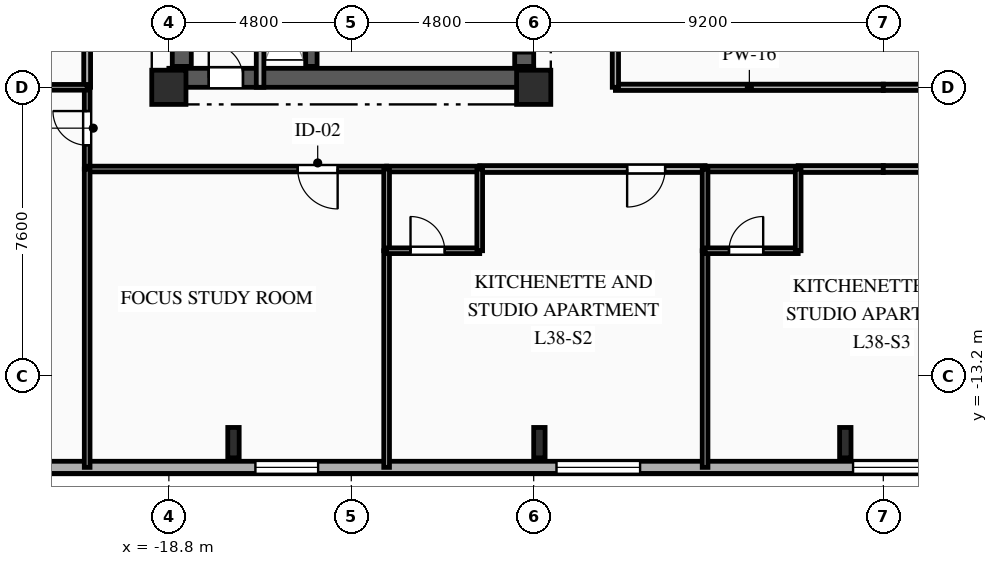
"""IFC4 building model, lengths in metres.
Left out: names, types, materials, properties, quantities, classifications, styles, units other than length and angle.
Written with IfcOpenShell. Run it as: python <this file> out.ifc"""

import sys

from ifc_helpers import new_model, si_unit, direction, frame, frame_2d, origin, origin_2d, place, context, subcontext, project, spatial, rectangle, i_section, extrude, element, fill, save


model = new_model("IFC4")
c1 = context("Model", 3, precision=1e-05, world=origin(), true_north=direction((0.0, 1.0)))
c2 = subcontext(c1, "Body", "Model", "MODEL_VIEW")
j1 = project(units=[si_unit("LENGTHUNIT", "METRE"), si_unit("PLANEANGLEUNIT", "RADIAN")], contexts=[c1])
p1 = place(None, origin())
s1 = spatial("IfcSite", under=j1, at=p1, CompositionType="ELEMENT")
p2 = place(p1, origin())
s2 = spatial("IfcBuilding", under=s1, at=p2, CompositionType="ELEMENT")
p3 = place(p2, frame((0.0, 0.0, 137.7)))
s3 = spatial("IfcBuildingStorey", under=s2, at=p3, CompositionType="ELEMENT", Elevation=137.7)
for number, where, z_axis, x_axis in (
    (1, (-18.8, -5.6, 0.0), (0.0, 0.0, 1.0), (1.0, 0.0, 0.0)),
    (2, (-9.2, -5.6, 0.0), (0.0, 0.0, 1.0), (1.0, 0.0, 0.0)),
):
    element("IfcColumn", number, at=place(p3, frame(where, z_axis=z_axis, x_axis=x_axis)), inside=s3, PredefinedType="COLUMN", context=c2, shape_type="SweptSolid", body=[
        extrude(rectangle(XDim=0.9, YDim=0.9, at=origin_2d()), origin(), (0.0, 0.0, 1.0), 3.35),
    ])
for number, where, z_axis, x_axis in (
    (3, (-17.1, -14.95, 0.0), (0.0, 0.0, 1.0), (1.0, 0.0, 0.0)),
    (4, (-9.05, -14.95, 0.0), (0.0, 0.0, 1.0), (1.0, 0.0, 0.0)),
    (5, (-1.0, -14.95, 0.0), (0.0, 0.0, 1.0), (1.0, 0.0, 0.0)),
):
    element("IfcColumn", number, at=place(p3, frame(where, z_axis=z_axis, x_axis=x_axis)), inside=s3, PredefinedType="COLUMN", context=c2, shape_type="SweptSolid", body=[
        extrude(i_section(OverallWidth=0.3, OverallDepth=0.8, WebThickness=0.018, FlangeThickness=0.033, FilletRadius=0.03, at=origin_2d()), origin(), (0.0, 0.0, 1.0), 3.35),
    ])
p4 = place(p3, frame((23.8, -15.6, 0.0), z_axis=(0.0, 0.0, 1.0), x_axis=(-1.0, 0.0, 0.0)))
e6 = element("IfcWall", 6, at=p4, inside=s3, PredefinedType="SOLIDWALL", context=c2, shape_type="SweptSolid", body=[
    extrude(rectangle(XDim=49.6, YDim=0.32, at=frame_2d((24.8, 0.0))), origin(), (0.0, 0.0, 1.0), 3.04),
])
p5 = place(p4, frame((1.13, 0.0, 0.85)))
e7 = element("IfcOpeningElement", 7, at=p5, cuts=e6, PredefinedType="OPENING", context=c2, shape_type="SweptSolid", body=[
    extrude(rectangle(XDim=1.1, YDim=1.85, at=frame_2d((0.55, 0.925))), frame((0.0, 0.17, 0.0), z_axis=(0.0, -1.0, 0.0), x_axis=(1.0, 0.0, 0.0)), (0.0, 0.0, 1.0), 0.34),
])
p6 = place(p4, frame((6.495, 0.0, 0.85)))
e8 = element("IfcOpeningElement", 8, at=p6, cuts=e6, PredefinedType="OPENING", context=c2, shape_type="SweptSolid", body=[
    extrude(rectangle(XDim=1.65, YDim=1.85, at=frame_2d((0.825, 0.925))), frame((0.0, 0.17, 0.0), z_axis=(0.0, -1.0, 0.0), x_axis=(1.0, 0.0, 0.0)), (0.0, 0.0, 1.0), 0.34),
])
p7 = place(p4, frame((13.996, 0.0, 0.85)))
e9 = element("IfcOpeningElement", 9, at=p7, cuts=e6, PredefinedType="OPENING", context=c2, shape_type="SweptSolid", body=[
    extrude(rectangle(XDim=2.2, YDim=1.85, at=frame_2d((1.1, 0.925))), frame((0.0, 0.17, 0.0), z_axis=(0.0, -1.0, 0.0), x_axis=(1.0, 0.0, 0.0)), (0.0, 0.0, 1.0), 0.34),
])
p8 = place(p4, frame((22.396, 0.0, 0.85)))
e10 = element("IfcOpeningElement", 10, at=p8, cuts=e6, PredefinedType="OPENING", context=c2, shape_type="SweptSolid", body=[
    extrude(rectangle(XDim=2.2, YDim=1.85, at=frame_2d((1.1, 0.925))), frame((0.0, 0.17, 0.0), z_axis=(0.0, -1.0, 0.0), x_axis=(1.0, 0.0, 0.0)), (0.0, 0.0, 1.0), 0.34),
])
p9 = place(p4, frame((30.2, 0.0, 0.85)))
e11 = element("IfcOpeningElement", 11, at=p9, cuts=e6, PredefinedType="OPENING", context=c2, shape_type="SweptSolid", body=[
    extrude(rectangle(XDim=2.2, YDim=1.85, at=frame_2d((1.1, 0.925))), frame((0.0, 0.17, 0.0), z_axis=(0.0, -1.0, 0.0), x_axis=(1.0, 0.0, 0.0)), (0.0, 0.0, 1.0), 0.34),
])
p10 = place(p4, frame((38.673, 0.0, 0.85)))
e12 = element("IfcOpeningElement", 12, at=p10, cuts=e6, PredefinedType="OPENING", context=c2, shape_type="SweptSolid", body=[
    extrude(rectangle(XDim=1.65, YDim=1.85, at=frame_2d((0.825, 0.925))), frame((0.0, 0.17, 0.0), z_axis=(0.0, -1.0, 0.0), x_axis=(1.0, 0.0, 0.0)), (0.0, 0.0, 1.0), 0.34),
])
p11 = place(p4, frame((46.175, 0.0, 0.85)))
e13 = element("IfcOpeningElement", 13, at=p11, cuts=e6, PredefinedType="OPENING", context=c2, shape_type="SweptSolid", body=[
    extrude(rectangle(XDim=1.65, YDim=1.85, at=frame_2d((0.825, 0.925))), frame((0.0, 0.17, 0.0), z_axis=(0.0, -1.0, 0.0), x_axis=(1.0, 0.0, 0.0)), (0.0, 0.0, 1.0), 0.34),
])
p12 = place(p3, frame((-18.8, -5.35, 0.0), z_axis=(0.0, 0.0, 1.0), x_axis=(1.0, 0.0, 0.0)))
e14 = element("IfcWall", 14, at=p12, inside=s3, PredefinedType="SHEAR", context=c2, shape_type="SweptSolid", body=[
    extrude(rectangle(XDim=9.6, YDim=0.5, at=frame_2d((4.8, 0.0))), origin(), (0.0, 0.0, 1.0), 3.04),
])
p13 = place(p12, frame((1.05, 0.0, 0.0)))
e15 = element("IfcOpeningElement", 15, at=p13, cuts=e14, PredefinedType="OPENING", context=c2, shape_type="SweptSolid", body=[
    extrude(rectangle(XDim=0.9, YDim=2.1, at=frame_2d((0.45, 1.05))), frame((0.0, 0.26, 0.0), z_axis=(0.0, -1.0, 0.0), x_axis=(1.0, 0.0, 0.0)), (0.0, 0.0, 1.0), 0.52),
])
p14 = place(p3, frame((-18.46, -5.05, 0.0), z_axis=(0.0, 0.0, 1.0), x_axis=(0.0, 1.0, 0.0)))
e16 = element("IfcWall", 16, at=p14, inside=s3, PredefinedType="SHEAR", context=c2, shape_type="SweptSolid", body=[
    extrude(rectangle(XDim=10.1, YDim=0.5, at=frame_2d((5.05, 0.0))), origin(), (0.0, 0.0, 1.0), 3.04),
])
p15 = place(p3, frame((-9.45, -5.05, 0.0), z_axis=(0.0, 0.0, 1.0), x_axis=(0.0, 1.0, 0.0)))
e17 = element("IfcWall", 17, at=p15, inside=s3, PredefinedType="SHEAR", context=c2, shape_type="SweptSolid", body=[
    extrude(rectangle(XDim=10.1, YDim=0.5, at=frame_2d((5.05, 0.0))), origin(), (0.0, 0.0, 1.0), 3.04),
])
p16 = place(p15, frame((7.15, 0.0, 0.0)))
e18 = element("IfcOpeningElement", 18, at=p16, cuts=e17, PredefinedType="OPENING", context=c2, shape_type="SweptSolid", body=[
    extrude(rectangle(XDim=0.9, YDim=2.1, at=frame_2d((0.45, 1.05))), frame((0.0, 0.26, 0.0), z_axis=(0.0, -1.0, 0.0), x_axis=(1.0, 0.0, 0.0)), (0.0, 0.0, 1.0), 0.52),
])
p17 = place(p15, frame((2.4, 0.0, 0.0)))
e19 = element("IfcOpeningElement", 19, at=p17, cuts=e17, PredefinedType="OPENING", context=c2, shape_type="SweptSolid", body=[
    extrude(rectangle(XDim=1.2, YDim=2.15, at=frame_2d((0.6, 1.075))), frame((0.0, 0.26, 0.0), z_axis=(0.0, -1.0, 0.0), x_axis=(1.0, 0.0, 0.0)), (0.0, 0.0, 1.0), 0.52),
])
p18 = place(p15, frame((0.35, 0.0, 0.0)))
e20 = element("IfcOpeningElement", 20, at=p18, cuts=e17, PredefinedType="OPENING", context=c2, shape_type="SweptSolid", body=[
    extrude(rectangle(XDim=0.9, YDim=2.1, at=frame_2d((0.45, 1.05))), frame((0.0, 0.26, 0.0), z_axis=(0.0, -1.0, 0.0), x_axis=(1.0, 0.0, 0.0)), (0.0, 0.0, 1.0), 0.52),
])
p19 = place(p15, frame((5.0, 0.0, 0.0)))
e21 = element("IfcOpeningElement", 21, at=p19, cuts=e17, PredefinedType="OPENING", context=c2, shape_type="SweptSolid", body=[
    extrude(rectangle(XDim=0.9, YDim=2.1, at=frame_2d((0.45, 1.05))), frame((0.0, 0.26, 0.0), z_axis=(0.0, -1.0, 0.0), x_axis=(1.0, 0.0, 0.0)), (0.0, 0.0, 1.0), 0.52),
])
p20 = place(p3, frame((-15.05, -5.05, 0.0), z_axis=(0.0, 0.0, 1.0), x_axis=(0.0, 1.0, 0.0)))
e22 = element("IfcWall", 22, at=p20, inside=s3, PredefinedType="SHEAR", context=c2, shape_type="SweptSolid", body=[
    extrude(rectangle(XDim=10.1, YDim=0.3, at=frame_2d((5.05, 0.0))), origin(), (0.0, 0.0, 1.0), 3.04),
])
p21 = place(p3, frame((-16.4, -5.6, 0.0), z_axis=(0.0, 0.0, 1.0), x_axis=(0.0, 1.0, 0.0)))
e23 = element("IfcWall", 23, at=p21, inside=s3, PredefinedType="PARTITIONING", context=c2, shape_type="SweptSolid", body=[
    extrude(rectangle(XDim=3.49, YDim=0.2, at=frame_2d((1.745, 0.0))), origin(), (0.0, 0.0, 1.0), 3.04),
])
p22 = place(p3, frame((-20.95, -7.75, 0.0), z_axis=(0.0, 0.0, 1.0), x_axis=(0.0, 1.0, 0.0)))
e24 = element("IfcWall", 24, at=p22, inside=s3, PredefinedType="PARTITIONING", context=c2, shape_type="SweptSolid", body=[
    extrude(rectangle(XDim=2.15, YDim=0.15, at=frame_2d((1.075, 0.0))), origin(), (0.0, 0.0, 1.0), 3.04),
])
p23 = place(p22, frame((0.625, 0.0, 0.0)))
e25 = element("IfcOpeningElement", 25, at=p23, cuts=e24, PredefinedType="OPENING", context=c2, shape_type="SweptSolid", body=[
    extrude(rectangle(XDim=0.9, YDim=2.1, at=frame_2d((0.45, 1.05))), frame((0.0, 0.085, 0.0), z_axis=(0.0, -1.0, 0.0), x_axis=(1.0, 0.0, 0.0)), (0.0, 0.0, 1.0), 0.17),
])
p24 = place(p3, frame((-13.07, -7.75, 0.0), z_axis=(0.0, 0.0, 1.0), x_axis=(-1.0, 0.0, 0.0)))
e26 = element("IfcWall", 26, at=p24, inside=s3, PredefinedType="PARTITIONING", context=c2, shape_type="SweptSolid", body=[
    extrude(rectangle(XDim=7.88, YDim=0.15, at=frame_2d((3.94, 0.0))), origin(), (0.0, 0.0, 1.0), 3.04),
])
p25 = place(p24, frame((1.289, 0.0, 0.0)))
e27 = element("IfcOpeningElement", 27, at=p25, cuts=e26, PredefinedType="OPENING", context=c2, shape_type="SweptSolid", body=[
    extrude(rectangle(XDim=1.05, YDim=2.15, at=frame_2d((0.525, 1.075))), frame((0.0, 0.085, 0.0), z_axis=(0.0, -1.0, 0.0), x_axis=(1.0, 0.0, 0.0)), (0.0, 0.0, 1.0), 0.17),
])
p26 = place(p3, frame((-4.69, -7.75, 0.0), z_axis=(0.0, 0.0, 1.0), x_axis=(-1.0, 0.0, 0.0)))
e28 = element("IfcWall", 28, at=p26, inside=s3, PredefinedType="PARTITIONING", context=c2, shape_type="SweptSolid", body=[
    extrude(rectangle(XDim=5.93, YDim=0.18, at=frame_2d((2.965, 0.0))), origin(), (0.0, 0.0, 1.0), 3.04),
])
p27 = place(p26, frame((1.051, 0.0, 0.0)))
e29 = element("IfcOpeningElement", 29, at=p27, cuts=e28, PredefinedType="OPENING", context=c2, shape_type="SweptSolid", body=[
    extrude(rectangle(XDim=1.0, YDim=2.15, at=frame_2d((0.5, 1.075))), frame((0.0, 0.1, 0.0), z_axis=(0.0, -1.0, 0.0), x_axis=(1.0, 0.0, 0.0)), (0.0, 0.0, 1.0), 0.2),
])
p28 = place(p3, frame((-10.62, -7.75, 0.0), z_axis=(0.0, 0.0, 1.0), x_axis=(-1.0, 0.0, 0.0)))
e30 = element("IfcWall", 30, at=p28, inside=s3, PredefinedType="PLUMBINGWALL", context=c2, shape_type="SweptSolid", body=[
    extrude(rectangle(XDim=2.45, YDim=0.15, at=frame_2d((1.225, 0.0))), origin(), (0.0, 0.0, 1.0), 3.04),
])
p29 = place(p3, frame((0.0, -7.75, 0.0), z_axis=(0.0, 0.0, 1.0), x_axis=(-1.0, 0.0, 0.0)))
e31 = element("IfcWall", 31, at=p29, inside=s3, PredefinedType="PARTITIONING", context=c2, shape_type="SweptSolid", body=[
    extrude(rectangle(XDim=2.24, YDim=0.18, at=frame_2d((1.12, 0.0))), origin(), (0.0, 0.0, 1.0), 3.04),
])
p30 = place(p3, frame((-2.24, -7.75, 0.0), z_axis=(0.0, 0.0, 1.0), x_axis=(-1.0, 0.0, 0.0)))
e32 = element("IfcWall", 32, at=p30, inside=s3, PredefinedType="PLUMBINGWALL", context=c2, shape_type="SweptSolid", body=[
    extrude(rectangle(XDim=2.45, YDim=0.15, at=frame_2d((1.225, 0.0))), origin(), (0.0, 0.0, 1.0), 3.04),
])
p31 = place(p3, frame((-7.05, -5.6, 0.0), z_axis=(0.0, 0.0, 1.0), x_axis=(1.0, 0.0, 0.0)))
e33 = element("IfcWall", 33, at=p31, inside=s3, PredefinedType="PARTITIONING", context=c2, shape_type="SweptSolid", body=[
    extrude(rectangle(XDim=7.05, YDim=0.165, at=frame_2d((3.525, 0.0))), origin(), (0.0, 0.0, 1.0), 2.525),
])
p32 = place(p3, frame((3.69, -7.75, 0.0), z_axis=(0.0, 0.0, 1.0), x_axis=(-1.0, 0.0, 0.0)))
e34 = element("IfcWall", 34, at=p32, inside=s3, PredefinedType="PARTITIONING", context=c2, shape_type="SweptSolid", body=[
    extrude(rectangle(XDim=3.69, YDim=0.18, at=frame_2d((1.845, 0.0))), origin(), (0.0, 0.0, 1.0), 3.04),
])
p33 = place(p32, frame((1.536, 0.0, 0.0)))
e35 = element("IfcOpeningElement", 35, at=p33, cuts=e34, PredefinedType="OPENING", context=c2, shape_type="SweptSolid", body=[
    extrude(rectangle(XDim=1.0, YDim=2.15, at=frame_2d((0.5, 1.075))), frame((0.0, 0.1, 0.0), z_axis=(0.0, -1.0, 0.0), x_axis=(1.0, 0.0, 0.0)), (0.0, 0.0, 1.0), 0.2),
])
p34 = place(p3, frame((0.0, -5.6, 0.0), z_axis=(0.0, 0.0, 1.0), x_axis=(1.0, 0.0, 0.0)))
e36 = element("IfcWall", 36, at=p34, inside=s3, PredefinedType="PARTITIONING", context=c2, shape_type="SweptSolid", body=[
    extrude(rectangle(XDim=7.05, YDim=0.165, at=frame_2d((3.525, 0.0))), origin(), (0.0, 0.0, 1.0), 2.525),
])
p35 = place(p3, frame((-20.95, -5.6, 0.0), z_axis=(0.0, 0.0, 1.0), x_axis=(0.0, 1.0, 0.0)))
e37 = element("IfcWall", 37, at=p35, inside=s3, PredefinedType="PARTITIONING", context=c2, shape_type="SweptSolid", body=[
    extrude(rectangle(XDim=14.1, YDim=0.18, at=frame_2d((7.05, 0.0))), origin(), (0.0, 0.0, 1.0), 3.04),
])
p36 = place(p35, frame((5.058, 0.0, 0.0)))
e38 = element("IfcOpeningElement", 38, at=p36, cuts=e37, PredefinedType="OPENING", context=c2, shape_type="SweptSolid", body=[
    extrude(rectangle(XDim=1.0, YDim=2.15, at=frame_2d((0.5, 1.075))), frame((0.0, 0.1, 0.0), z_axis=(0.0, -1.0, 0.0), x_axis=(1.0, 0.0, 0.0)), (0.0, 0.0, 1.0), 0.2),
])
p37 = place(p3, frame((-7.05, -2.95, 0.0), z_axis=(0.0, 0.0, 1.0), x_axis=(0.0, -1.0, 0.0)))
e39 = element("IfcWall", 39, at=p37, inside=s3, PredefinedType="PARTITIONING", context=c2, shape_type="SweptSolid", body=[
    extrude(rectangle(XDim=2.65, YDim=0.165, at=frame_2d((1.325, 0.0))), origin(), (0.0, 0.0, 1.0), 3.04),
])
p38 = place(p3, frame((-20.95, -5.6, 0.0), z_axis=(0.0, 0.0, 1.0), x_axis=(-1.0, 0.0, 0.0)))
e40 = element("IfcWall", 40, at=p38, inside=s3, PredefinedType="PARTITIONING", context=c2, shape_type="SweptSolid", body=[
    extrude(rectangle(XDim=2.65, YDim=0.15, at=frame_2d((1.325, 0.0))), origin(), (0.0, 0.0, 1.0), 3.04),
])
p39 = place(p38, frame((0.965, 0.0, 0.0)))
e41 = element("IfcOpeningElement", 41, at=p39, cuts=e40, PredefinedType="OPENING", context=c2, shape_type="SweptSolid", body=[
    extrude(rectangle(XDim=1.05, YDim=2.15, at=frame_2d((0.525, 1.075))), frame((0.0, 0.085, 0.0), z_axis=(0.0, -1.0, 0.0), x_axis=(1.0, 0.0, 0.0)), (0.0, 0.0, 1.0), 0.17),
])
p40 = place(p3, frame((-20.95, -7.75, 0.0), z_axis=(0.0, 0.0, 1.0), x_axis=(0.0, -1.0, 0.0)))
e42 = element("IfcWall", 42, at=p40, inside=s3, PredefinedType="PARTITIONING", context=c2, shape_type="SweptSolid", body=[
    extrude(rectangle(XDim=7.85, YDim=0.15, at=frame_2d((3.925, 0.0))), origin(), (0.0, 0.0, 1.0), 3.04),
])
p41 = place(p3, frame((-13.07, -9.9, 0.0), z_axis=(0.0, 0.0, 1.0), x_axis=(0.0, -1.0, 0.0)))
e43 = element("IfcWall", 43, at=p41, inside=s3, PredefinedType="PARTITIONING", context=c2, shape_type="SweptSolid", body=[
    extrude(rectangle(XDim=5.7, YDim=0.15, at=frame_2d((2.85, 0.0))), origin(), (0.0, 0.0, 1.0), 3.04),
])
p42 = place(p3, frame((-13.07, -7.75, 0.0), z_axis=(0.0, 0.0, 1.0), x_axis=(0.0, -1.0, 0.0)))
e44 = element("IfcWall", 44, at=p42, inside=s3, PredefinedType="PLUMBINGWALL", context=c2, shape_type="SweptSolid", body=[
    extrude(rectangle(XDim=2.15, YDim=0.15, at=frame_2d((1.075, 0.0))), origin(), (0.0, 0.0, 1.0), 3.04),
])
p43 = place(p3, frame((-13.07, -9.9, 0.0), z_axis=(0.0, 0.0, 1.0), x_axis=(1.0, 0.0, 0.0)))
e45 = element("IfcWall", 45, at=p43, inside=s3, PredefinedType="PLUMBINGWALL", context=c2, shape_type="SweptSolid", body=[
    extrude(rectangle(XDim=2.45, YDim=0.15, at=frame_2d((1.225, 0.0))), origin(), (0.0, 0.0, 1.0), 3.04),
])
p44 = place(p43, frame((0.629, 0.0, 0.0)))
e46 = element("IfcOpeningElement", 46, at=p44, cuts=e45, PredefinedType="OPENING", context=c2, shape_type="SweptSolid", body=[
    extrude(rectangle(XDim=0.9, YDim=2.1, at=frame_2d((0.45, 1.05))), frame((0.0, 0.085, 0.0), z_axis=(0.0, -1.0, 0.0), x_axis=(1.0, 0.0, 0.0)), (0.0, 0.0, 1.0), 0.17),
])
p45 = place(p3, frame((-10.62, -9.9, 0.0), z_axis=(0.0, 0.0, 1.0), x_axis=(0.0, 1.0, 0.0)))
e47 = element("IfcWall", 47, at=p45, inside=s3, PredefinedType="PLUMBINGWALL", context=c2, shape_type="SweptSolid", body=[
    extrude(rectangle(XDim=2.15, YDim=0.15, at=frame_2d((1.075, 0.0))), origin(), (0.0, 0.0, 1.0), 3.04),
])
p46 = place(p3, frame((-4.69, -9.9, 0.0), z_axis=(0.0, 0.0, 1.0), x_axis=(0.0, -1.0, 0.0)))
e48 = element("IfcWall", 48, at=p46, inside=s3, PredefinedType="PARTITIONING", context=c2, shape_type="SweptSolid", body=[
    extrude(rectangle(XDim=5.7, YDim=0.15, at=frame_2d((2.85, 0.0))), origin(), (0.0, 0.0, 1.0), 3.04),
])
p47 = place(p3, frame((-4.69, -7.75, 0.0), z_axis=(0.0, 0.0, 1.0), x_axis=(0.0, -1.0, 0.0)))
e49 = element("IfcWall", 49, at=p47, inside=s3, PredefinedType="PLUMBINGWALL", context=c2, shape_type="SweptSolid", body=[
    extrude(rectangle(XDim=2.15, YDim=0.15, at=frame_2d((1.075, 0.0))), origin(), (0.0, 0.0, 1.0), 3.04),
])
p48 = place(p3, frame((-4.69, -9.9, 0.0), z_axis=(0.0, 0.0, 1.0), x_axis=(1.0, 0.0, 0.0)))
e50 = element("IfcWall", 50, at=p48, inside=s3, PredefinedType="PLUMBINGWALL", context=c2, shape_type="SweptSolid", body=[
    extrude(rectangle(XDim=2.45, YDim=0.15, at=frame_2d((1.225, 0.0))), origin(), (0.0, 0.0, 1.0), 3.04),
])
p49 = place(p48, frame((0.629, 0.0, 0.0)))
e51 = element("IfcOpeningElement", 51, at=p49, cuts=e50, PredefinedType="OPENING", context=c2, shape_type="SweptSolid", body=[
    extrude(rectangle(XDim=0.9, YDim=2.1, at=frame_2d((0.45, 1.05))), frame((0.0, 0.085, 0.0), z_axis=(0.0, -1.0, 0.0), x_axis=(1.0, 0.0, 0.0)), (0.0, 0.0, 1.0), 0.17),
])
p50 = place(p3, frame((-2.24, -9.9, 0.0), z_axis=(0.0, 0.0, 1.0), x_axis=(0.0, 1.0, 0.0)))
e52 = element("IfcWall", 52, at=p50, inside=s3, PredefinedType="PLUMBINGWALL", context=c2, shape_type="SweptSolid", body=[
    extrude(rectangle(XDim=2.15, YDim=0.15, at=frame_2d((1.075, 0.0))), origin(), (0.0, 0.0, 1.0), 3.04),
])
p51 = place(p8, origin())
e53 = element("IfcWindow", 53, at=p51, inside=s3, PartitioningType="SINGLE_PANEL", PredefinedType="WINDOW", context=c2, shape_type="SweptSolid", body=[
    extrude(rectangle(XDim=2.2, YDim=1.85, at=frame_2d((1.1, 0.925))), frame((0.0, 0.03, 0.0), z_axis=(0.0, -1.0, 0.0), x_axis=(1.0, 0.0, 0.0)), (0.0, 0.0, 1.0), 0.06),
])
fill(e10, e53)
p52 = place(p9, origin())
e54 = element("IfcWindow", 54, at=p52, inside=s3, PartitioningType="SINGLE_PANEL", PredefinedType="WINDOW", context=c2, shape_type="SweptSolid", body=[
    extrude(rectangle(XDim=2.2, YDim=1.85, at=frame_2d((1.1, 0.925))), frame((0.0, 0.03, 0.0), z_axis=(0.0, -1.0, 0.0), x_axis=(1.0, 0.0, 0.0)), (0.0, 0.0, 1.0), 0.06),
])
fill(e11, e54)
p53 = place(p10, origin())
e55 = element("IfcWindow", 55, at=p53, inside=s3, PartitioningType="SINGLE_PANEL", PredefinedType="WINDOW", context=c2, shape_type="SweptSolid", body=[
    extrude(rectangle(XDim=1.65, YDim=1.85, at=frame_2d((0.825, 0.925))), frame((0.0, 0.03, 0.0), z_axis=(0.0, -1.0, 0.0), x_axis=(1.0, 0.0, 0.0)), (0.0, 0.0, 1.0), 0.06),
])
fill(e12, e55)
p54 = place(p13, origin())
e56 = element("IfcDoor", 56, at=p54, inside=s3, OperationType="SINGLE_SWING_LEFT", PredefinedType="DOOR", context=c2, shape_type="SweptSolid", body=[
    extrude(rectangle(XDim=0.9, YDim=2.1, at=frame_2d((0.45, 1.05))), frame((0.0, 0.025, 0.0), z_axis=(0.0, -1.0, 0.0), x_axis=(1.0, 0.0, 0.0)), (0.0, 0.0, 1.0), 0.05),
])
fill(e15, e56)
p55 = place(p18, origin())
e57 = element("IfcDoor", 57, at=p55, inside=s3, OperationType="SINGLE_SWING_RIGHT", PredefinedType="DOOR", context=c2, shape_type="SweptSolid", body=[
    extrude(rectangle(XDim=0.9, YDim=2.1, at=frame_2d((0.45, 1.05))), frame((0.0, 0.025, 0.0), z_axis=(0.0, -1.0, 0.0), x_axis=(1.0, 0.0, 0.0)), (0.0, 0.0, 1.0), 0.05),
])
fill(e20, e57)
p56 = place(p23, origin())
e58 = element("IfcDoor", 58, at=p56, inside=s3, OperationType="SINGLE_SWING_RIGHT", PredefinedType="DOOR", context=c2, shape_type="SweptSolid", body=[
    extrude(rectangle(XDim=0.9, YDim=2.1, at=frame_2d((0.45, 1.05))), frame((0.0, 0.025, 0.0), z_axis=(0.0, -1.0, 0.0), x_axis=(1.0, 0.0, 0.0)), (0.0, 0.0, 1.0), 0.05),
])
fill(e25, e58)
p57 = place(p25, origin())
e59 = element("IfcDoor", 59, at=p57, inside=s3, OperationType="SINGLE_SWING_LEFT", PredefinedType="DOOR", context=c2, shape_type="SweptSolid", body=[
    extrude(rectangle(XDim=1.05, YDim=2.15, at=frame_2d((0.525, 1.075))), frame((0.0, 0.025, 0.0), z_axis=(0.0, -1.0, 0.0), x_axis=(1.0, 0.0, 0.0)), (0.0, 0.0, 1.0), 0.05),
])
fill(e27, e59)
p58 = place(p27, origin())
e60 = element("IfcDoor", 60, at=p58, inside=s3, OperationType="SINGLE_SWING_RIGHT", PredefinedType="DOOR", context=c2, shape_type="SweptSolid", body=[
    extrude(rectangle(XDim=1.0, YDim=2.15, at=frame_2d((0.5, 1.075))), frame((0.0, 0.025, 0.0), z_axis=(0.0, -1.0, 0.0), x_axis=(1.0, 0.0, 0.0)), (0.0, 0.0, 1.0), 0.05),
])
fill(e29, e60)
p59 = place(p44, origin())
e61 = element("IfcDoor", 61, at=p59, inside=s3, OperationType="SINGLE_SWING_LEFT", PredefinedType="DOOR", context=c2, shape_type="SweptSolid", body=[
    extrude(rectangle(XDim=0.9, YDim=2.1, at=frame_2d((0.45, 1.05))), frame((0.0, 0.025, 0.0), z_axis=(0.0, -1.0, 0.0), x_axis=(1.0, 0.0, 0.0)), (0.0, 0.0, 1.0), 0.05),
])
fill(e46, e61)
p60 = place(p49, origin())
e62 = element("IfcDoor", 62, at=p60, inside=s3, OperationType="SINGLE_SWING_RIGHT", PredefinedType="DOOR", context=c2, shape_type="SweptSolid", body=[
    extrude(rectangle(XDim=0.9, YDim=2.1, at=frame_2d((0.45, 1.05))), frame((0.0, 0.025, 0.0), z_axis=(0.0, -1.0, 0.0), x_axis=(1.0, 0.0, 0.0)), (0.0, 0.0, 1.0), 0.05),
])
fill(e51, e62)
save(model, sys.argv[1])
